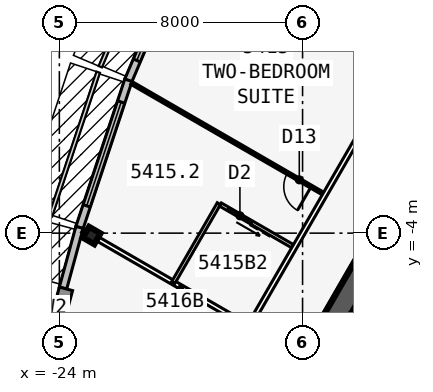
"""IFC4 building model, lengths in metres.
Left out: names, types, materials, properties, quantities, classifications, styles, units other than length and angle.
Written with IfcOpenShell. Run it as: python <this file> out.ifc"""

import sys

from ifc_helpers import new_model, si_unit, direction, frame, frame_2d, origin, origin_2d, place, context, subcontext, project, spatial, rectangle, i_section, extrude, element, fill, save


model = new_model("IFC4")
c1 = context("Model", 3, precision=1e-05, world=origin(), true_north=direction((0.0, 1.0)))
c2 = subcontext(c1, "Body", "Model", "MODEL_VIEW")
j1 = project(units=[si_unit("LENGTHUNIT", "METRE"), si_unit("PLANEANGLEUNIT", "RADIAN")], contexts=[c1])
p1 = place(None, origin())
s1 = spatial("IfcSite", under=j1, at=p1, CompositionType="ELEMENT")
p2 = place(p1, origin())
s2 = spatial("IfcBuilding", under=s1, at=p2, CompositionType="ELEMENT")
p3 = place(p2, frame((0.0, 0.0, 204.5)))
s3 = spatial("IfcBuildingStorey", under=s2, at=p3, CompositionType="ELEMENT", Elevation=204.5)
p4 = place(p3, frame((0.0, 19.052, 0.0), z_axis=(0.0, 0.0, 1.0), x_axis=(-0.499999749417, -0.866025548458, 0.0)))
e1 = element("IfcWall", 1, at=p4, inside=s3, PredefinedType="SHEAR", context=c2, shape_type="SweptSolid", body=[
    extrude(rectangle(XDim=33.0, YDim=0.75, at=frame_2d((16.5, 0.0))), origin(), (0.0, 0.0, 1.0), 3.6),
])
p5 = place(p4, frame((14.15, 0.0, 0.0)))
e2 = element("IfcOpeningElement", 2, at=p5, cuts=e1, PredefinedType="OPENING", context=c2, shape_type="SweptSolid", body=[
    extrude(rectangle(XDim=1.8, YDim=2.13, at=frame_2d((0.9, 1.065))), frame((0.0, 0.385, 0.0), z_axis=(0.0, -1.0, 0.0), x_axis=(1.0, 0.0, 0.0)), (0.0, 0.0, 1.0), 0.77),
])
p6 = place(p4, frame((12.6, 0.0, 0.0)))
e3 = element("IfcOpeningElement", 3, at=p6, cuts=e1, PredefinedType="OPENING", context=c2, shape_type="SweptSolid", body=[
    extrude(rectangle(XDim=1.0, YDim=2.13, at=frame_2d((0.5, 1.065))), frame((0.0, 0.385, 0.0), z_axis=(0.0, -1.0, 0.0), x_axis=(1.0, 0.0, 0.0)), (0.0, 0.0, 1.0), 0.77),
])
p7 = place(p3, frame((-22.937, -4.078, 0.0), z_axis=(0.0, 0.0, 1.0), x_axis=(-0.5, -0.866025403784, 0.0)))
e4 = element("IfcColumn", 4, at=p7, inside=s3, PredefinedType="COLUMN", context=c2, shape_type="SweptSolid", body=[
    extrude(i_section(OverallWidth=0.411, OverallDepth=0.434, WebThickness=0.036, FlangeThickness=0.057, at=origin_2d()), origin(), (0.0, 0.0, 1.0), 3.6),
])
p8 = place(p3, frame((-19.768, 5.657, 0.0), z_axis=(0.0, 0.0, 1.0), x_axis=(-0.390096809471, -0.920773848044, 0.0)))
e5 = element("IfcWall", 5, at=p8, inside=s3, PredefinedType="STANDARD", context=c2, shape_type="SweptSolid", body=[
    extrude(rectangle(XDim=5.038, YDim=0.25, at=frame_2d((2.519, 0.0))), origin(), (0.0, 0.0, 1.0), 3.435),
])
p9 = place(p8, frame((0.719, 0.0, 0.45)))
e6 = element("IfcOpeningElement", 6, at=p9, cuts=e5, PredefinedType="OPENING", context=c2, shape_type="SweptSolid", body=[
    extrude(rectangle(XDim=3.6, YDim=2.6, at=frame_2d((1.8, 1.3))), frame((0.0, 0.135, 0.0), z_axis=(0.0, -1.0, 0.0), x_axis=(1.0, 0.0, 0.0)), (0.0, 0.0, 1.0), 0.27),
])
p10 = place(p3, frame((-21.729, 1.028, 0.0), z_axis=(0.0, 0.0, 1.0), x_axis=(-0.315108478109, -0.949055660656, 0.0)))
e7 = element("IfcWall", 7, at=p10, inside=s3, PredefinedType="STANDARD", context=c2, shape_type="SweptSolid", body=[
    extrude(rectangle(XDim=5.105, YDim=0.25, at=frame_2d((2.552, 0.0))), origin(), (0.0, 0.0, 1.0), 3.435),
])
p11 = place(p10, frame((0.752, 0.0, 0.45)))
e8 = element("IfcOpeningElement", 8, at=p11, cuts=e7, PredefinedType="OPENING", context=c2, shape_type="SweptSolid", body=[
    extrude(rectangle(XDim=3.6, YDim=2.6, at=frame_2d((1.8, 1.3))), frame((0.0, 0.135, 0.0), z_axis=(0.0, -1.0, 0.0), x_axis=(1.0, 0.0, 0.0)), (0.0, 0.0, 1.0), 0.27),
])
p12 = place(p3, frame((-23.336, -3.811, 0.0), z_axis=(0.0, 0.0, 1.0), x_axis=(-0.262867703986, -0.964831887015, 0.0)))
e9 = element("IfcWall", 9, at=p12, inside=s3, PredefinedType="STANDARD", context=c2, shape_type="SweptSolid", body=[
    extrude(rectangle(XDim=2.068, YDim=0.25, at=frame_2d((1.034, 0.0))), origin(), (0.0, 0.0, 1.0), 3.435),
])
p13 = place(p3, frame((-23.783, -5.832, 0.0), z_axis=(0.0, 0.0, 1.0), x_axis=(-0.258784695888, -0.965935029479, 0.0)))
e10 = element("IfcWall", 10, at=p13, inside=s3, PredefinedType="SOLIDWALL", context=c2, shape_type="SweptSolid", body=[
    extrude(rectangle(XDim=4.184, YDim=0.45, at=frame_2d((2.092, 0.0))), origin(), (0.0, 0.0, 1.0), 3.435),
])
p14 = place(p13, frame((0.592, 0.0, 0.45)))
e11 = element("IfcOpeningElement", 11, at=p14, cuts=e10, PredefinedType="OPENING", context=c2, shape_type="SweptSolid", body=[
    extrude(rectangle(XDim=3.0, YDim=2.6, at=frame_2d((1.5, 1.3))), frame((0.0, 0.235, 0.0), z_axis=(0.0, -1.0, 0.0), x_axis=(1.0, 0.0, 0.0)), (0.0, 0.0, 1.0), 0.47),
])
p15 = place(p3, frame((-0.425, 22.966, 0.0), z_axis=(0.0, 0.0, 1.0), x_axis=(-0.500000265775, -0.866025250339, 0.0)))
e12 = element("IfcWall", 12, at=p15, inside=s3, PredefinedType="PARTITIONING", context=c2, shape_type="SweptSolid", body=[
    extrude(rectangle(XDim=39.354, YDim=0.15, at=frame_2d((19.677, 0.0))), origin(), (0.0, 0.0, 1.0), 3.435),
])
p16 = place(p15, frame((1.102, 0.0, 0.0)))
e13 = element("IfcOpeningElement", 13, at=p16, cuts=e12, PredefinedType="OPENING", context=c2, shape_type="SweptSolid", body=[
    extrude(rectangle(XDim=0.95, YDim=2.13, at=frame_2d((0.475, 1.065))), frame((0.0, 0.085, 0.0), z_axis=(0.0, -1.0, 0.0), x_axis=(1.0, 0.0, 0.0)), (0.0, 0.0, 1.0), 0.17),
])
p17 = place(p15, frame((7.902, 0.0, 0.0)))
e14 = element("IfcOpeningElement", 14, at=p17, cuts=e12, PredefinedType="OPENING", context=c2, shape_type="SweptSolid", body=[
    extrude(rectangle(XDim=0.95, YDim=2.13, at=frame_2d((0.475, 1.065))), frame((0.0, 0.085, 0.0), z_axis=(0.0, -1.0, 0.0), x_axis=(1.0, 0.0, 0.0)), (0.0, 0.0, 1.0), 0.17),
])
p18 = place(p15, frame((17.302, 0.0, 0.0)))
e15 = element("IfcOpeningElement", 15, at=p18, cuts=e12, PredefinedType="OPENING", context=c2, shape_type="SweptSolid", body=[
    extrude(rectangle(XDim=0.95, YDim=2.13, at=frame_2d((0.475, 1.065))), frame((0.0, 0.085, 0.0), z_axis=(0.0, -1.0, 0.0), x_axis=(1.0, 0.0, 0.0)), (0.0, 0.0, 1.0), 0.17),
])
p19 = place(p15, frame((26.702, 0.0, 0.0)))
e16 = element("IfcOpeningElement", 16, at=p19, cuts=e12, PredefinedType="OPENING", context=c2, shape_type="SweptSolid", body=[
    extrude(rectangle(XDim=0.95, YDim=2.13, at=frame_2d((0.475, 1.065))), frame((0.0, 0.085, 0.0), z_axis=(0.0, -1.0, 0.0), x_axis=(1.0, 0.0, 0.0)), (0.0, 0.0, 1.0), 0.17),
])
p20 = place(p15, frame((37.302, 0.0, 0.0)))
e17 = element("IfcOpeningElement", 17, at=p20, cuts=e12, PredefinedType="OPENING", context=c2, shape_type="SweptSolid", body=[
    extrude(rectangle(XDim=0.95, YDim=2.13, at=frame_2d((0.475, 1.065))), frame((0.0, 0.085, 0.0), z_axis=(0.0, -1.0, 0.0), x_axis=(1.0, 0.0, 0.0)), (0.0, 0.0, 1.0), 0.17),
])
p21 = place(p3, frame((-12.829, 1.633, 0.0), z_axis=(0.0, 0.0, 1.0), x_axis=(-0.866030558329, 0.49999107196, 0.0)))
e18 = element("IfcWall", 18, at=p21, inside=s3, PredefinedType="PARTITIONING", context=c2, shape_type="SweptSolid", body=[
    extrude(rectangle(XDim=7.894, YDim=0.1, at=frame_2d((3.947, 0.0))), origin(), (0.0, 0.0, 1.0), 2.589),
])
p22 = place(p21, frame((0.45, 0.0, 0.0)))
e19 = element("IfcOpeningElement", 19, at=p22, cuts=e18, PredefinedType="OPENING", context=c2, shape_type="SweptSolid", body=[
    extrude(rectangle(XDim=0.9, YDim=2.13, at=frame_2d((0.45, 1.065))), frame((0.0, 0.06, 0.0), z_axis=(0.0, -1.0, 0.0), x_axis=(1.0, 0.0, 0.0)), (0.0, 0.0, 1.0), 0.12),
])
p23 = place(p3, frame((-15.329, -2.697, 0.0), z_axis=(0.0, 0.0, 1.0), x_axis=(-0.866032413668, 0.499987858329, 0.0)))
e20 = element("IfcWall", 20, at=p23, inside=s3, PredefinedType="PARTITIONING", context=c2, shape_type="SweptSolid", body=[
    extrude(rectangle(XDim=7.273, YDim=0.1, at=frame_2d((3.636, 0.0))), origin(), (0.0, 0.0, 1.0), 2.589),
])
p24 = place(p23, frame((0.45, 0.0, 0.0)))
e21 = element("IfcOpeningElement", 21, at=p24, cuts=e20, PredefinedType="OPENING", context=c2, shape_type="SweptSolid", body=[
    extrude(rectangle(XDim=0.9, YDim=2.13, at=frame_2d((0.45, 1.065))), frame((0.0, 0.06, 0.0), z_axis=(0.0, -1.0, 0.0), x_axis=(1.0, 0.0, 0.0)), (0.0, 0.0, 1.0), 0.12),
])
p25 = place(p3, frame((-17.829, -7.027, 0.0), z_axis=(0.0, 0.0, 1.0), x_axis=(-0.866026604282, 0.499997920671, 0.0)))
e22 = element("IfcWall", 22, at=p25, inside=s3, PredefinedType="PARTITIONING", context=c2, shape_type="SweptSolid", body=[
    extrude(rectangle(XDim=6.24, YDim=0.15, at=frame_2d((3.12, 0.0))), origin(), (0.0, 0.0, 1.0), 2.589),
])
p26 = place(p3, frame((-18.753, -3.029, 0.0), z_axis=(0.0, 0.0, 1.0), x_axis=(-0.50002537861, -0.866010750942, 0.0)))
e23 = element("IfcWall", 23, at=p26, inside=s3, PredefinedType="PLUMBINGWALL", context=c2, shape_type="SweptSolid", body=[
    extrude(rectangle(XDim=3.0, YDim=0.12, at=frame_2d((1.5, 0.0))), origin(), (0.0, 0.0, 1.0), 3.435),
])
p27 = place(p3, frame((-16.329, -4.429, 0.0), z_axis=(0.0, 0.0, 1.0), x_axis=(-0.865997131366, 0.500048966069, 0.0)))
e24 = element("IfcWall", 24, at=p27, inside=s3, PredefinedType="PLUMBINGWALL", context=c2, shape_type="SweptSolid", body=[
    extrude(rectangle(XDim=2.74, YDim=0.12, at=frame_2d((1.37, 0.0))), origin(), (0.0, 0.0, 1.0), 3.435),
])
p28 = place(p27, frame((1.55, 0.0, 0.0)))
e25 = element("IfcOpeningElement", 25, at=p28, cuts=e24, PredefinedType="OPENING", context=c2, shape_type="SweptSolid", body=[
    extrude(rectangle(XDim=0.9, YDim=2.13, at=frame_2d((0.45, 1.065))), frame((0.0, 0.07, 0.0), z_axis=(0.0, -1.0, 0.0), x_axis=(1.0, 0.0, 0.0)), (0.0, 0.0, 1.0), 0.14),
])
p29 = place(p3, frame((-19.993, -5.777, 0.0), z_axis=(0.0, 0.0, 1.0), x_axis=(-0.500033551112, -0.866006032174, 0.0)))
e26 = element("IfcWall", 26, at=p29, inside=s3, PredefinedType="PLUMBINGWALL", context=c2, shape_type="SweptSolid", body=[
    extrude(rectangle(XDim=2.4, YDim=0.12, at=frame_2d((1.2, 0.0))), origin(), (0.0, 0.0, 1.0), 3.435),
])
p30 = place(p3, frame((-12.848, -9.151, 0.0), z_axis=(0.0, 0.0, 1.0), x_axis=(-0.499952404951, 0.866052881055, 0.0)))
e27 = element("IfcWall", 27, at=p30, inside=s3, PredefinedType="SOLIDWALL", context=c2, shape_type="SweptSolid", body=[
    extrude(rectangle(XDim=3.002, YDim=0.2, at=frame_2d((1.501, 0.0))), origin(), (0.0, 0.0, 1.0), 3.435),
])
p31 = place(p9, origin())
e28 = element("IfcWindow", 28, at=p31, inside=s3, PartitioningType="SINGLE_PANEL", PredefinedType="WINDOW", context=c2, shape_type="SweptSolid", body=[
    extrude(rectangle(XDim=3.6, YDim=2.6, at=frame_2d((1.8, 1.3))), frame((0.0, 0.03, 0.0), z_axis=(0.0, -1.0, 0.0), x_axis=(1.0, 0.0, 0.0)), (0.0, 0.0, 1.0), 0.06),
])
fill(e6, e28)
p32 = place(p11, origin())
e29 = element("IfcWindow", 29, at=p32, inside=s3, PartitioningType="SINGLE_PANEL", PredefinedType="WINDOW", context=c2, shape_type="SweptSolid", body=[
    extrude(rectangle(XDim=3.6, YDim=2.6, at=frame_2d((1.8, 1.3))), frame((0.0, 0.03, 0.0), z_axis=(0.0, -1.0, 0.0), x_axis=(1.0, 0.0, 0.0)), (0.0, 0.0, 1.0), 0.06),
])
fill(e8, e29)
p33 = place(p14, origin())
e30 = element("IfcWindow", 30, at=p33, inside=s3, PartitioningType="SINGLE_PANEL", PredefinedType="WINDOW", context=c2, shape_type="SweptSolid", body=[
    extrude(rectangle(XDim=3.0, YDim=2.6, at=frame_2d((1.5, 1.3))), frame((0.0, 0.03, 0.0), z_axis=(0.0, -1.0, 0.0), x_axis=(1.0, 0.0, 0.0)), (0.0, 0.0, 1.0), 0.06),
])
fill(e11, e30)
p34 = place(p24, origin())
e31 = element("IfcDoor", 31, at=p34, inside=s3, OperationType="SINGLE_SWING_LEFT", PredefinedType="DOOR", context=c2, shape_type="SweptSolid", body=[
    extrude(rectangle(XDim=0.9, YDim=2.13, at=frame_2d((0.45, 1.065))), frame((0.0, 0.025, 0.0), z_axis=(0.0, -1.0, 0.0), x_axis=(1.0, 0.0, 0.0)), (0.0, 0.0, 1.0), 0.05),
])
fill(e21, e31)
p35 = place(p28, origin())
e32 = element("IfcDoor", 32, at=p35, inside=s3, OperationType="SLIDING_TO_LEFT", PredefinedType="DOOR", context=c2, shape_type="SweptSolid", body=[
    extrude(rectangle(XDim=0.9, YDim=2.13, at=frame_2d((0.45, 1.065))), frame((0.0, 0.025, 0.0), z_axis=(0.0, -1.0, 0.0), x_axis=(1.0, 0.0, 0.0)), (0.0, 0.0, 1.0), 0.05),
])
fill(e25, e32)
save(model, sys.argv[1])
